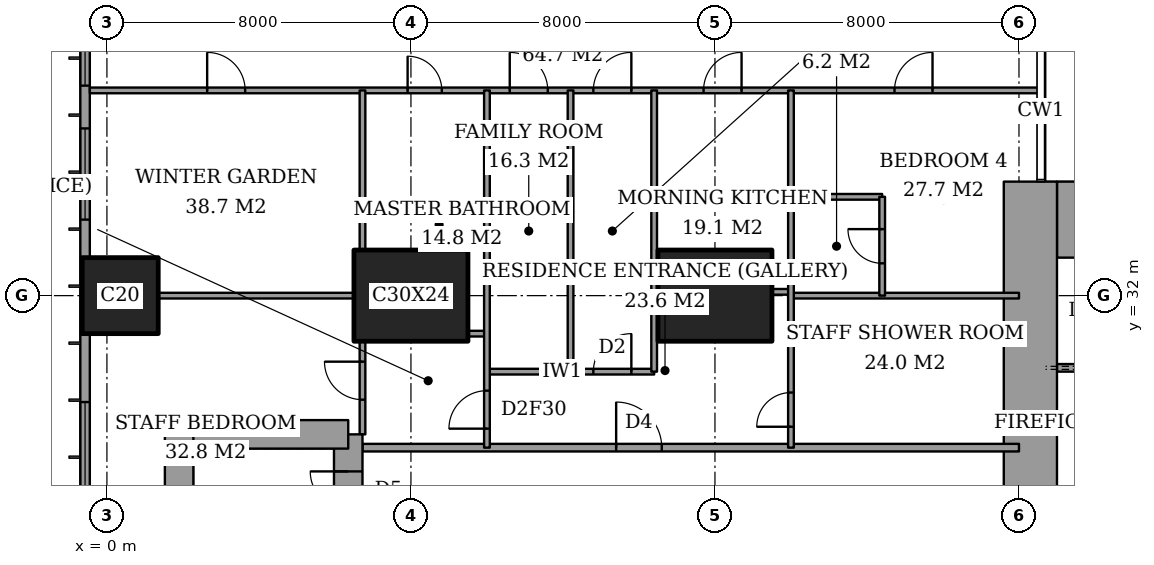
"""IFC4 building model, lengths in metres.
Left out: names, types, materials, properties, quantities, classifications, styles, units other than length and angle.
Written with IfcOpenShell. Run it as: python <this file> out.ifc"""

import sys

from ifc_helpers import new_model, si_unit, direction, frame, frame_2d, origin, origin_2d, place, context, subcontext, project, spatial, rectangle, extrude, element, fill, save


model = new_model("IFC4")
c1 = context("Model", 3, precision=1e-05, world=origin(), true_north=direction((0.0, 1.0)))
c2 = subcontext(c1, "Body", "Model", "MODEL_VIEW")
j1 = project(units=[si_unit("LENGTHUNIT", "METRE"), si_unit("PLANEANGLEUNIT", "RADIAN")], contexts=[c1])
p1 = place(None, origin())
s1 = spatial("IfcSite", under=j1, at=p1, CompositionType="ELEMENT")
p2 = place(p1, origin())
s2 = spatial("IfcBuilding", under=s1, at=p2, CompositionType="ELEMENT")
p3 = place(p2, frame((0.0, 0.0, 99.8)))
s3 = spatial("IfcBuildingStorey", under=s2, at=p3, CompositionType="ELEMENT", Elevation=99.8)
p4 = place(p3, frame((0.35, 32.0, 0.0), z_axis=(0.0, 0.0, 1.0), x_axis=(1.0, 0.0, 0.0)))
e1 = element("IfcColumn", 1, at=p4, inside=s3, PredefinedType="COLUMN", context=c2, shape_type="SweptSolid", body=[
    extrude(rectangle(XDim=2.0, YDim=2.0, at=origin_2d()), origin(), (0.0, 0.0, 1.0), 3.6),
])
for number, where, z_axis, x_axis in (
    (2, (8.0, 32.0, 0.0), (0.0, 0.0, 1.0), (1.0, 0.0, 0.0)),
    (3, (16.0, 32.0, 0.0), (0.0, 0.0, 1.0), (1.0, 0.0, 0.0)),
):
    element("IfcColumn", number, at=place(p3, frame(where, z_axis=z_axis, x_axis=x_axis)), inside=s3, PredefinedType="COLUMN", context=c2, shape_type="SweptSolid", body=[
        extrude(rectangle(XDim=3.0, YDim=2.4, at=origin_2d()), origin(), (0.0, 0.0, 1.0), 3.6),
    ])
p5 = place(p3, frame((25.0, 34.0, 0.0), z_axis=(0.0, 0.0, 1.0), x_axis=(1.0, 0.0, 0.0)))
e4 = element("IfcWall", 4, at=p5, inside=s3, PredefinedType="SHEAR", context=c2, shape_type="SweptSolid", body=[
    extrude(rectangle(XDim=3.15, YDim=2.0, at=frame_2d((1.575, 0.0))), origin(), (0.0, 0.0, 1.0), 3.6),
])
p6 = place(p3, frame((24.3, 23.15, 0.0), z_axis=(0.0, 0.0, 1.0), x_axis=(0.0, 1.0, 0.0)))
e5 = element("IfcWall", 5, at=p6, inside=s3, PredefinedType="SHEAR", context=c2, shape_type="SweptSolid", body=[
    extrude(rectangle(XDim=11.85, YDim=1.4, at=frame_2d((5.925, 0.0))), origin(), (0.0, 0.0, 1.0), 3.6),
])
p7 = place(p6, frame((0.75, 0.0, 0.0)))
e6 = element("IfcOpeningElement", 6, at=p7, cuts=e5, PredefinedType="OPENING", context=c2, shape_type="SweptSolid", body=[
    extrude(rectangle(XDim=1.8, YDim=2.4, at=frame_2d((0.9, 1.2))), frame((0.0, 0.71, 0.0), z_axis=(0.0, -1.0, 0.0), x_axis=(1.0, 0.0, 0.0)), (0.0, 0.0, 1.0), 1.42),
])
p8 = place(p3, frame((6.35, 19.65, 0.0), z_axis=(0.0, 0.0, 1.0), x_axis=(0.0, 1.0, 0.0)))
e7 = element("IfcWall", 7, at=p8, inside=s3, PredefinedType="SHEAR", context=c2, shape_type="SweptSolid", body=[
    extrude(rectangle(XDim=8.7, YDim=0.75, at=frame_2d((4.35, 0.0))), origin(), (0.0, 0.0, 1.0), 3.6),
])
p9 = place(p8, frame((6.725, 0.0, 0.0)))
e8 = element("IfcOpeningElement", 8, at=p9, cuts=e7, PredefinedType="OPENING", context=c2, shape_type="SweptSolid", body=[
    extrude(rectangle(XDim=1.0, YDim=2.1, at=frame_2d((0.5, 1.05))), frame((0.0, 0.385, 0.0), z_axis=(0.0, -1.0, 0.0), x_axis=(1.0, 0.0, 0.0)), (0.0, 0.0, 1.0), 0.77),
])
p10 = place(p3, frame((6.35, 28.35, 0.0), z_axis=(0.0, 0.0, 1.0), x_axis=(-1.0, 0.0, 0.0)))
e9 = element("IfcWall", 9, at=p10, inside=s3, PredefinedType="SHEAR", context=c2, shape_type="SweptSolid", body=[
    extrude(rectangle(XDim=4.45, YDim=0.75, at=frame_2d((2.225, 0.0))), origin(), (0.0, 0.0, 1.0), 3.6),
])
p11 = place(p3, frame((1.9, 28.35, 0.0), z_axis=(0.0, 0.0, 1.0), x_axis=(0.0, -1.0, 0.0)))
e10 = element("IfcWall", 10, at=p11, inside=s3, PredefinedType="SHEAR", context=c2, shape_type="SweptSolid", body=[
    extrude(rectangle(XDim=8.7, YDim=0.75, at=frame_2d((4.35, 0.0))), origin(), (0.0, 0.0, 1.0), 3.6),
])
p12 = place(p3, frame((-0.575, 44.825, 0.0), z_axis=(0.0, 0.0, 1.0), x_axis=(0.0, -1.0, 0.0)))
e11 = element("IfcWall", 11, at=p12, inside=s3, PredefinedType="SOLIDWALL", context=c2, shape_type="SweptSolid", body=[
    extrude(rectangle(XDim=41.65, YDim=0.25, at=frame_2d((20.825, 0.0))), origin(), (0.0, 0.0, 1.0), 3.6),
])
p13 = place(p12, frame((0.775, 0.0, 0.4)))
e12 = element("IfcOpeningElement", 12, at=p13, cuts=e11, PredefinedType="OPENING", context=c2, shape_type="SweptSolid", body=[
    extrude(rectangle(XDim=2.4, YDim=2.2, at=frame_2d((1.2, 1.1))), frame((0.0, 0.135, 0.0), z_axis=(0.0, -1.0, 0.0), x_axis=(1.0, 0.0, 0.0)), (0.0, 0.0, 1.0), 0.27),
])
p14 = place(p12, frame((6.1, 0.0, 0.4)))
e13 = element("IfcOpeningElement", 13, at=p14, cuts=e11, PredefinedType="OPENING", context=c2, shape_type="SweptSolid", body=[
    extrude(rectangle(XDim=1.2, YDim=2.2, at=frame_2d((0.6, 1.1))), frame((0.0, 0.135, 0.0), z_axis=(0.0, -1.0, 0.0), x_axis=(1.0, 0.0, 0.0)), (0.0, 0.0, 1.0), 0.27),
])
p15 = place(p12, frame((8.425, 0.0, 0.4)))
e14 = element("IfcOpeningElement", 14, at=p15, cuts=e11, PredefinedType="OPENING", context=c2, shape_type="SweptSolid", body=[
    extrude(rectangle(XDim=2.4, YDim=2.2, at=frame_2d((1.2, 1.1))), frame((0.0, 0.135, 0.0), z_axis=(0.0, -1.0, 0.0), x_axis=(1.0, 0.0, 0.0)), (0.0, 0.0, 1.0), 0.27),
])
p16 = place(p12, frame((15.625, 0.0, 0.4)))
e15 = element("IfcOpeningElement", 15, at=p16, cuts=e11, PredefinedType="OPENING", context=c2, shape_type="SweptSolid", body=[
    extrude(rectangle(XDim=2.4, YDim=2.2, at=frame_2d((1.2, 1.1))), frame((0.0, 0.135, 0.0), z_axis=(0.0, -1.0, 0.0), x_axis=(1.0, 0.0, 0.0)), (0.0, 0.0, 1.0), 0.27),
])
p17 = place(p12, frame((23.625, 0.0, 0.4)))
e16 = element("IfcOpeningElement", 16, at=p17, cuts=e11, PredefinedType="OPENING", context=c2, shape_type="SweptSolid", body=[
    extrude(rectangle(XDim=2.4, YDim=2.2, at=frame_2d((1.2, 1.1))), frame((0.0, 0.135, 0.0), z_axis=(0.0, -1.0, 0.0), x_axis=(1.0, 0.0, 0.0)), (0.0, 0.0, 1.0), 0.27),
])
p18 = place(p12, frame((30.725, 0.0, 0.4)))
e17 = element("IfcOpeningElement", 17, at=p18, cuts=e11, PredefinedType="OPENING", context=c2, shape_type="SweptSolid", body=[
    extrude(rectangle(XDim=2.4, YDim=2.2, at=frame_2d((1.2, 1.1))), frame((0.0, 0.135, 0.0), z_axis=(0.0, -1.0, 0.0), x_axis=(1.0, 0.0, 0.0)), (0.0, 0.0, 1.0), 0.27),
])
p19 = place(p12, frame((34.325, 0.0, 0.4)))
e18 = element("IfcOpeningElement", 18, at=p19, cuts=e11, PredefinedType="OPENING", context=c2, shape_type="SweptSolid", body=[
    extrude(rectangle(XDim=1.2, YDim=2.2, at=frame_2d((0.6, 1.1))), frame((0.0, 0.135, 0.0), z_axis=(0.0, -1.0, 0.0), x_axis=(1.0, 0.0, 0.0)), (0.0, 0.0, 1.0), 0.27),
])
p20 = place(p12, frame((38.475, 0.0, 0.4)))
e19 = element("IfcOpeningElement", 19, at=p20, cuts=e11, PredefinedType="OPENING", context=c2, shape_type="SweptSolid", body=[
    extrude(rectangle(XDim=2.4, YDim=2.2, at=frame_2d((1.2, 1.1))), frame((0.0, 0.135, 0.0), z_axis=(0.0, -1.0, 0.0), x_axis=(1.0, 0.0, 0.0)), (0.0, 0.0, 1.0), 0.27),
])
p21 = place(p3, frame((6.725, 28.0, 0.0), z_axis=(0.0, 0.0, 1.0), x_axis=(1.0, 0.0, 0.0)))
e20 = element("IfcWall", 20, at=p21, inside=s3, PredefinedType="PARTITIONING", context=c2, shape_type="SweptSolid", body=[
    extrude(rectangle(XDim=17.275, YDim=0.2, at=frame_2d((8.637, 0.0))), origin(), (0.0, 0.0, 1.0), 3.35),
])
p22 = place(p21, frame((6.675, 0.0, 0.0)))
e21 = element("IfcOpeningElement", 21, at=p22, cuts=e20, PredefinedType="OPENING", context=c2, shape_type="SweptSolid", body=[
    extrude(rectangle(XDim=1.2, YDim=2.4, at=frame_2d((0.6, 1.2))), frame((0.0, 0.11, 0.0), z_axis=(0.0, -1.0, 0.0), x_axis=(1.0, 0.0, 0.0)), (0.0, 0.0, 1.0), 0.22),
])
p23 = place(p3, frame((10.0, 30.0, 0.0), z_axis=(0.0, 0.0, 1.0), x_axis=(1.0, 0.0, 0.0)))
e22 = element("IfcWall", 22, at=p23, inside=s3, PredefinedType="PARTITIONING", context=c2, shape_type="SweptSolid", body=[
    extrude(rectangle(XDim=4.4, YDim=0.15, at=frame_2d((2.2, 0.0))), origin(), (0.0, 0.0, 1.0), 3.35),
])
p24 = place(p23, frame((2.8, 0.0, 0.0)))
e23 = element("IfcOpeningElement", 23, at=p24, cuts=e22, PredefinedType="OPENING", context=c2, shape_type="SweptSolid", body=[
    extrude(rectangle(XDim=1.0, YDim=2.1, at=frame_2d((0.5, 1.05))), frame((0.0, 0.085, 0.0), z_axis=(0.0, -1.0, 0.0), x_axis=(1.0, 0.0, 0.0)), (0.0, 0.0, 1.0), 0.17),
])
p25 = place(p3, frame((9.5, 31.0, 0.0), z_axis=(0.0, 0.0, 1.0), x_axis=(1.0, 0.0, 0.0)))
e24 = element("IfcWall", 24, at=p25, inside=s3, PredefinedType="PARTITIONING", context=c2, shape_type="SweptSolid", body=[
    extrude(rectangle(XDim=0.5, YDim=0.15, at=frame_2d((0.25, 0.0))), origin(), (0.0, 0.0, 1.0), 3.35),
])
p26 = place(p3, frame((1.35, 32.0, 0.0), z_axis=(0.0, 0.0, 1.0), x_axis=(1.0, 0.0, 0.0)))
e25 = element("IfcWall", 25, at=p26, inside=s3, PredefinedType="PARTITIONING", context=c2, shape_type="SweptSolid", body=[
    extrude(rectangle(XDim=5.15, YDim=0.15, at=frame_2d((2.575, 0.0))), origin(), (0.0, 0.0, 1.0), 2.634),
])
p27 = place(p3, frame((18.0, 32.0, 0.0), z_axis=(0.0, 0.0, 1.0), x_axis=(1.0, 0.0, 0.0)))
e26 = element("IfcWall", 26, at=p27, inside=s3, PredefinedType="PARTITIONING", context=c2, shape_type="SweptSolid", body=[
    extrude(rectangle(XDim=6.0, YDim=0.15, at=frame_2d((3.0, 0.0))), origin(), (0.0, 0.0, 1.0), 2.634),
])
p28 = place(p3, frame((17.5, 32.1, 0.0), z_axis=(0.0, 0.0, 1.0), x_axis=(1.0, 0.0, 0.0)))
e27 = element("IfcWall", 27, at=p28, inside=s3, PredefinedType="PARTITIONING", context=c2, shape_type="SweptSolid", body=[
    extrude(rectangle(XDim=0.5, YDim=0.15, at=frame_2d((0.25, 0.0))), origin(), (0.0, 0.0, 1.0), 2.634),
])
p29 = place(p3, frame((18.0, 34.6, 0.0), z_axis=(0.0, 0.0, 1.0), x_axis=(1.0, 0.0, 0.0)))
e28 = element("IfcWall", 28, at=p29, inside=s3, PredefinedType="PARTITIONING", context=c2, shape_type="SweptSolid", body=[
    extrude(rectangle(XDim=2.4, YDim=0.15, at=frame_2d((1.2, 0.0))), origin(), (0.0, 0.0, 1.0), 3.35),
])
p30 = place(p3, frame((-0.45, 37.4, 0.0), z_axis=(0.0, 0.0, 1.0), x_axis=(1.0, 0.0, 0.0)))
e29 = element("IfcWall", 29, at=p30, inside=s3, PredefinedType="PARTITIONING", context=c2, shape_type="SweptSolid", body=[
    extrude(rectangle(XDim=25.011, YDim=0.15, at=frame_2d((12.505, 0.0))), origin(), (0.0, 0.0, 1.0), 3.35),
])
p31 = place(p30, frame((13.25, 0.0, 0.0)))
e30 = element("IfcOpeningElement", 30, at=p31, cuts=e29, PredefinedType="OPENING", context=c2, shape_type="SweptSolid", body=[
    extrude(rectangle(XDim=1.0, YDim=2.1, at=frame_2d((0.5, 1.05))), frame((0.0, 0.085, 0.0), z_axis=(0.0, -1.0, 0.0), x_axis=(1.0, 0.0, 0.0)), (0.0, 0.0, 1.0), 0.17),
])
p32 = place(p30, frame((3.087, 0.0, 0.0)))
e31 = element("IfcOpeningElement", 31, at=p32, cuts=e29, PredefinedType="OPENING", context=c2, shape_type="SweptSolid", body=[
    extrude(rectangle(XDim=1.0, YDim=2.1, at=frame_2d((0.5, 1.05))), frame((0.0, 0.085, 0.0), z_axis=(0.0, -1.0, 0.0), x_axis=(1.0, 0.0, 0.0)), (0.0, 0.0, 1.0), 0.17),
])
p33 = place(p30, frame((8.363, 0.0, 0.0)))
e32 = element("IfcOpeningElement", 32, at=p33, cuts=e29, PredefinedType="OPENING", context=c2, shape_type="SweptSolid", body=[
    extrude(rectangle(XDim=0.9, YDim=2.1, at=frame_2d((0.45, 1.05))), frame((0.0, 0.085, 0.0), z_axis=(0.0, -1.0, 0.0), x_axis=(1.0, 0.0, 0.0)), (0.0, 0.0, 1.0), 0.17),
])
p34 = place(p30, frame((11.05, 0.0, 0.0)))
e33 = element("IfcOpeningElement", 33, at=p34, cuts=e29, PredefinedType="OPENING", context=c2, shape_type="SweptSolid", body=[
    extrude(rectangle(XDim=1.0, YDim=2.1, at=frame_2d((0.5, 1.05))), frame((0.0, 0.085, 0.0), z_axis=(0.0, -1.0, 0.0), x_axis=(1.0, 0.0, 0.0)), (0.0, 0.0, 1.0), 0.17),
])
p35 = place(p30, frame((16.15, 0.0, 0.0)))
e34 = element("IfcOpeningElement", 34, at=p35, cuts=e29, PredefinedType="OPENING", context=c2, shape_type="SweptSolid", body=[
    extrude(rectangle(XDim=1.0, YDim=2.1, at=frame_2d((0.5, 1.05))), frame((0.0, 0.085, 0.0), z_axis=(0.0, -1.0, 0.0), x_axis=(1.0, 0.0, 0.0)), (0.0, 0.0, 1.0), 0.17),
])
p36 = place(p30, frame((21.175, 0.0, 0.0)))
e35 = element("IfcOpeningElement", 35, at=p36, cuts=e29, PredefinedType="OPENING", context=c2, shape_type="SweptSolid", body=[
    extrude(rectangle(XDim=1.0, YDim=2.1, at=frame_2d((0.5, 1.05))), frame((0.0, 0.085, 0.0), z_axis=(0.0, -1.0, 0.0), x_axis=(1.0, 0.0, 0.0)), (0.0, 0.0, 1.0), 0.17),
])
p37 = place(p3, frame((6.725, 28.35, 0.0), z_axis=(0.0, 0.0, 1.0), x_axis=(0.0, 1.0, 0.0)))
e36 = element("IfcWall", 36, at=p37, inside=s3, PredefinedType="PARTITIONING", context=c2, shape_type="SweptSolid", body=[
    extrude(rectangle(XDim=2.45, YDim=0.15, at=frame_2d((1.225, 0.0))), origin(), (0.0, 0.0, 1.0), 3.35),
])
p38 = place(p37, frame((0.913, 0.0, 0.0)))
e37 = element("IfcOpeningElement", 37, at=p38, cuts=e36, PredefinedType="OPENING", context=c2, shape_type="SweptSolid", body=[
    extrude(rectangle(XDim=1.0, YDim=2.1, at=frame_2d((0.5, 1.05))), frame((0.0, 0.085, 0.0), z_axis=(0.0, -1.0, 0.0), x_axis=(1.0, 0.0, 0.0)), (0.0, 0.0, 1.0), 0.17),
])
p39 = place(p3, frame((6.725, 33.2, 0.0), z_axis=(0.0, 0.0, 1.0), x_axis=(0.0, 1.0, 0.0)))
e38 = element("IfcWall", 38, at=p39, inside=s3, PredefinedType="PARTITIONING", context=c2, shape_type="SweptSolid", body=[
    extrude(rectangle(XDim=4.2, YDim=0.15, at=frame_2d((2.1, 0.0))), origin(), (0.0, 0.0, 1.0), 3.35),
])
p40 = place(p3, frame((10.0, 28.0, 0.0), z_axis=(0.0, 0.0, 1.0), x_axis=(0.0, 1.0, 0.0)))
e39 = element("IfcWall", 39, at=p40, inside=s3, PredefinedType="PARTITIONING", context=c2, shape_type="SweptSolid", body=[
    extrude(rectangle(XDim=9.4, YDim=0.15, at=frame_2d((4.7, 0.0))), origin(), (0.0, 0.0, 1.0), 3.35),
])
p41 = place(p40, frame((0.5, 0.0, 0.0)))
e40 = element("IfcOpeningElement", 40, at=p41, cuts=e39, PredefinedType="OPENING", context=c2, shape_type="SweptSolid", body=[
    extrude(rectangle(XDim=1.0, YDim=2.1, at=frame_2d((0.5, 1.05))), frame((0.0, 0.085, 0.0), z_axis=(0.0, -1.0, 0.0), x_axis=(1.0, 0.0, 0.0)), (0.0, 0.0, 1.0), 0.17),
])
for number, where, z_axis, x_axis in (
    (41, (12.2, 30.0, 0.0), (0.0, 0.0, 1.0), (0.0, 1.0, 0.0)),
    (42, (14.4, 30.0, 0.0), (0.0, 0.0, 1.0), (0.0, 1.0, 0.0)),
):
    element("IfcWall", number, at=place(p3, frame(where, z_axis=z_axis, x_axis=x_axis)), inside=s3, PredefinedType="PARTITIONING", context=c2, shape_type="SweptSolid", body=[
        extrude(rectangle(XDim=7.4, YDim=0.15, at=frame_2d((3.7, 0.0))), origin(), (0.0, 0.0, 1.0), 3.35),
    ])
p42 = place(p3, frame((18.0, 28.0, 0.0), z_axis=(0.0, 0.0, 1.0), x_axis=(0.0, 1.0, 0.0)))
e43 = element("IfcWall", 43, at=p42, inside=s3, PredefinedType="PARTITIONING", context=c2, shape_type="SweptSolid", body=[
    extrude(rectangle(XDim=9.4, YDim=0.15, at=frame_2d((4.7, 0.0))), origin(), (0.0, 0.0, 1.0), 3.35),
])
p43 = place(p42, frame((0.55, 0.0, 0.0)))
e44 = element("IfcOpeningElement", 44, at=p43, cuts=e43, PredefinedType="OPENING", context=c2, shape_type="SweptSolid", body=[
    extrude(rectangle(XDim=0.9, YDim=2.1, at=frame_2d((0.45, 1.05))), frame((0.0, 0.085, 0.0), z_axis=(0.0, -1.0, 0.0), x_axis=(1.0, 0.0, 0.0)), (0.0, 0.0, 1.0), 0.17),
])
p44 = place(p3, frame((20.4, 32.0, 0.0), z_axis=(0.0, 0.0, 1.0), x_axis=(0.0, 1.0, 0.0)))
e45 = element("IfcWall", 45, at=p44, inside=s3, PredefinedType="PARTITIONING", context=c2, shape_type="SweptSolid", body=[
    extrude(rectangle(XDim=2.6, YDim=0.15, at=frame_2d((1.3, 0.0))), origin(), (0.0, 0.0, 1.0), 3.35),
])
p45 = place(p44, frame((0.85, 0.0, 0.0)))
e46 = element("IfcOpeningElement", 46, at=p45, cuts=e45, PredefinedType="OPENING", context=c2, shape_type="SweptSolid", body=[
    extrude(rectangle(XDim=0.9, YDim=2.1, at=frame_2d((0.45, 1.05))), frame((0.0, 0.085, 0.0), z_axis=(0.0, -1.0, 0.0), x_axis=(1.0, 0.0, 0.0)), (0.0, 0.0, 1.0), 0.17),
])
p46 = place(p3, frame((25.0, 30.1, 0.0), z_axis=(0.0, 0.0, 1.0), x_axis=(1.0, 0.0, 0.0)))
e47 = element("IfcWall", 47, at=p46, inside=s3, PredefinedType="PARTITIONING", context=c2, shape_type="SweptSolid", body=[
    extrude(rectangle(XDim=12.7, YDim=0.2, at=frame_2d((6.35, 0.0))), origin(), (0.0, 0.0, 1.0), 3.6),
])
p47 = place(p46, frame((0.9, 0.0, 0.0)))
e48 = element("IfcOpeningElement", 48, at=p47, cuts=e47, PredefinedType="OPENING", context=c2, shape_type="SweptSolid", body=[
    extrude(rectangle(XDim=1.2, YDim=2.1, at=frame_2d((0.6, 1.05))), frame((0.0, 0.11, 0.0), z_axis=(0.0, -1.0, 0.0), x_axis=(1.0, 0.0, 0.0)), (0.0, 0.0, 1.0), 0.22),
])
p48 = place(p14, origin())
e49 = element("IfcWindow", 49, at=p48, inside=s3, PartitioningType="SINGLE_PANEL", PredefinedType="WINDOW", context=c2, shape_type="SweptSolid", body=[
    extrude(rectangle(XDim=1.2, YDim=2.2, at=frame_2d((0.6, 1.1))), frame((0.0, 0.03, 0.0), z_axis=(0.0, -1.0, 0.0), x_axis=(1.0, 0.0, 0.0)), (0.0, 0.0, 1.0), 0.06),
])
fill(e13, e49)
p49 = place(p15, origin())
e50 = element("IfcWindow", 50, at=p49, inside=s3, PartitioningType="SINGLE_PANEL", PredefinedType="WINDOW", context=c2, shape_type="SweptSolid", body=[
    extrude(rectangle(XDim=2.4, YDim=2.2, at=frame_2d((1.2, 1.1))), frame((0.0, 0.03, 0.0), z_axis=(0.0, -1.0, 0.0), x_axis=(1.0, 0.0, 0.0)), (0.0, 0.0, 1.0), 0.06),
])
fill(e14, e50)
p50 = place(p16, origin())
e51 = element("IfcWindow", 51, at=p50, inside=s3, PartitioningType="SINGLE_PANEL", PredefinedType="WINDOW", context=c2, shape_type="SweptSolid", body=[
    extrude(rectangle(XDim=2.4, YDim=2.2, at=frame_2d((1.2, 1.1))), frame((0.0, 0.03, 0.0), z_axis=(0.0, -1.0, 0.0), x_axis=(1.0, 0.0, 0.0)), (0.0, 0.0, 1.0), 0.06),
])
fill(e15, e51)
p51 = place(p31, origin())
e52 = element("IfcDoor", 52, at=p51, inside=s3, OperationType="SINGLE_SWING_LEFT", PredefinedType="DOOR", context=c2, shape_type="SweptSolid", body=[
    extrude(rectangle(XDim=1.0, YDim=2.1, at=frame_2d((0.5, 1.05))), frame((0.0, 0.025, 0.0), z_axis=(0.0, -1.0, 0.0), x_axis=(1.0, 0.0, 0.0)), (0.0, 0.0, 1.0), 0.05),
])
fill(e30, e52)
p52 = place(p32, origin())
e53 = element("IfcDoor", 53, at=p52, inside=s3, OperationType="SINGLE_SWING_RIGHT", PredefinedType="DOOR", context=c2, shape_type="SweptSolid", body=[
    extrude(rectangle(XDim=1.0, YDim=2.1, at=frame_2d((0.5, 1.05))), frame((0.0, 0.025, 0.0), z_axis=(0.0, -1.0, 0.0), x_axis=(1.0, 0.0, 0.0)), (0.0, 0.0, 1.0), 0.05),
])
fill(e31, e53)
p53 = place(p38, origin())
e54 = element("IfcDoor", 54, at=p53, inside=s3, OperationType="SINGLE_SWING_LEFT", PredefinedType="DOOR", context=c2, shape_type="SweptSolid", body=[
    extrude(rectangle(XDim=1.0, YDim=2.1, at=frame_2d((0.5, 1.05))), frame((0.0, 0.025, 0.0), z_axis=(0.0, -1.0, 0.0), x_axis=(1.0, 0.0, 0.0)), (0.0, 0.0, 1.0), 0.05),
])
fill(e37, e54)
p54 = place(p33, origin())
e55 = element("IfcDoor", 55, at=p54, inside=s3, OperationType="SINGLE_SWING_RIGHT", PredefinedType="DOOR", context=c2, shape_type="SweptSolid", body=[
    extrude(rectangle(XDim=0.9, YDim=2.1, at=frame_2d((0.45, 1.05))), frame((0.0, 0.025, 0.0), z_axis=(0.0, -1.0, 0.0), x_axis=(1.0, 0.0, 0.0)), (0.0, 0.0, 1.0), 0.05),
])
fill(e32, e55)
p55 = place(p41, origin())
e56 = element("IfcDoor", 56, at=p55, inside=s3, OperationType="SINGLE_SWING_RIGHT", PredefinedType="DOOR", context=c2, shape_type="SweptSolid", body=[
    extrude(rectangle(XDim=1.0, YDim=2.1, at=frame_2d((0.5, 1.05))), frame((0.0, 0.025, 0.0), z_axis=(0.0, -1.0, 0.0), x_axis=(1.0, 0.0, 0.0)), (0.0, 0.0, 1.0), 0.05),
])
fill(e40, e56)
p56 = place(p22, origin())
e57 = element("IfcDoor", 57, at=p56, inside=s3, OperationType="SINGLE_SWING_RIGHT", PredefinedType="DOOR", context=c2, shape_type="SweptSolid", body=[
    extrude(rectangle(XDim=1.2, YDim=2.4, at=frame_2d((0.6, 1.2))), frame((0.0, 0.025, 0.0), z_axis=(0.0, -1.0, 0.0), x_axis=(1.0, 0.0, 0.0)), (0.0, 0.0, 1.0), 0.05),
])
fill(e21, e57)
p57 = place(p34, origin())
e58 = element("IfcDoor", 58, at=p57, inside=s3, OperationType="SINGLE_SWING_RIGHT", PredefinedType="DOOR", context=c2, shape_type="SweptSolid", body=[
    extrude(rectangle(XDim=1.0, YDim=2.1, at=frame_2d((0.5, 1.05))), frame((0.0, 0.025, 0.0), z_axis=(0.0, -1.0, 0.0), x_axis=(1.0, 0.0, 0.0)), (0.0, 0.0, 1.0), 0.05),
])
fill(e33, e58)
p58 = place(p24, origin())
e59 = element("IfcDoor", 59, at=p58, inside=s3, OperationType="SINGLE_SWING_LEFT", PredefinedType="DOOR", context=c2, shape_type="SweptSolid", body=[
    extrude(rectangle(XDim=1.0, YDim=2.1, at=frame_2d((0.5, 1.05))), frame((0.0, 0.025, 0.0), z_axis=(0.0, -1.0, 0.0), x_axis=(1.0, 0.0, 0.0)), (0.0, 0.0, 1.0), 0.05),
])
fill(e23, e59)
p59 = place(p35, origin())
e60 = element("IfcDoor", 60, at=p59, inside=s3, OperationType="SINGLE_SWING_LEFT", PredefinedType="DOOR", context=c2, shape_type="SweptSolid", body=[
    extrude(rectangle(XDim=1.0, YDim=2.1, at=frame_2d((0.5, 1.05))), frame((0.0, 0.025, 0.0), z_axis=(0.0, -1.0, 0.0), x_axis=(1.0, 0.0, 0.0)), (0.0, 0.0, 1.0), 0.05),
])
fill(e34, e60)
p60 = place(p45, origin())
e61 = element("IfcDoor", 61, at=p60, inside=s3, OperationType="SINGLE_SWING_LEFT", PredefinedType="DOOR", context=c2, shape_type="SweptSolid", body=[
    extrude(rectangle(XDim=0.9, YDim=2.1, at=frame_2d((0.45, 1.05))), frame((0.0, 0.025, 0.0), z_axis=(0.0, -1.0, 0.0), x_axis=(1.0, 0.0, 0.0)), (0.0, 0.0, 1.0), 0.05),
])
fill(e46, e61)
p61 = place(p36, origin())
e62 = element("IfcDoor", 62, at=p61, inside=s3, OperationType="SINGLE_SWING_LEFT", PredefinedType="DOOR", context=c2, shape_type="SweptSolid", body=[
    extrude(rectangle(XDim=1.0, YDim=2.1, at=frame_2d((0.5, 1.05))), frame((0.0, 0.025, 0.0), z_axis=(0.0, -1.0, 0.0), x_axis=(1.0, 0.0, 0.0)), (0.0, 0.0, 1.0), 0.05),
])
fill(e35, e62)
p62 = place(p43, origin())
e63 = element("IfcDoor", 63, at=p62, inside=s3, OperationType="SINGLE_SWING_RIGHT", PredefinedType="DOOR", context=c2, shape_type="SweptSolid", body=[
    extrude(rectangle(XDim=0.9, YDim=2.1, at=frame_2d((0.45, 1.05))), frame((0.0, 0.025, 0.0), z_axis=(0.0, -1.0, 0.0), x_axis=(1.0, 0.0, 0.0)), (0.0, 0.0, 1.0), 0.05),
])
fill(e44, e63)
p63 = place(p9, origin())
e64 = element("IfcDoor", 64, at=p63, inside=s3, OperationType="SINGLE_SWING_LEFT", PredefinedType="DOOR", context=c2, shape_type="SweptSolid", body=[
    extrude(rectangle(XDim=1.0, YDim=2.1, at=frame_2d((0.5, 1.05))), frame((0.0, 0.025, 0.0), z_axis=(0.0, -1.0, 0.0), x_axis=(1.0, 0.0, 0.0)), (0.0, 0.0, 1.0), 0.05),
])
fill(e8, e64)
save(model, sys.argv[1])
